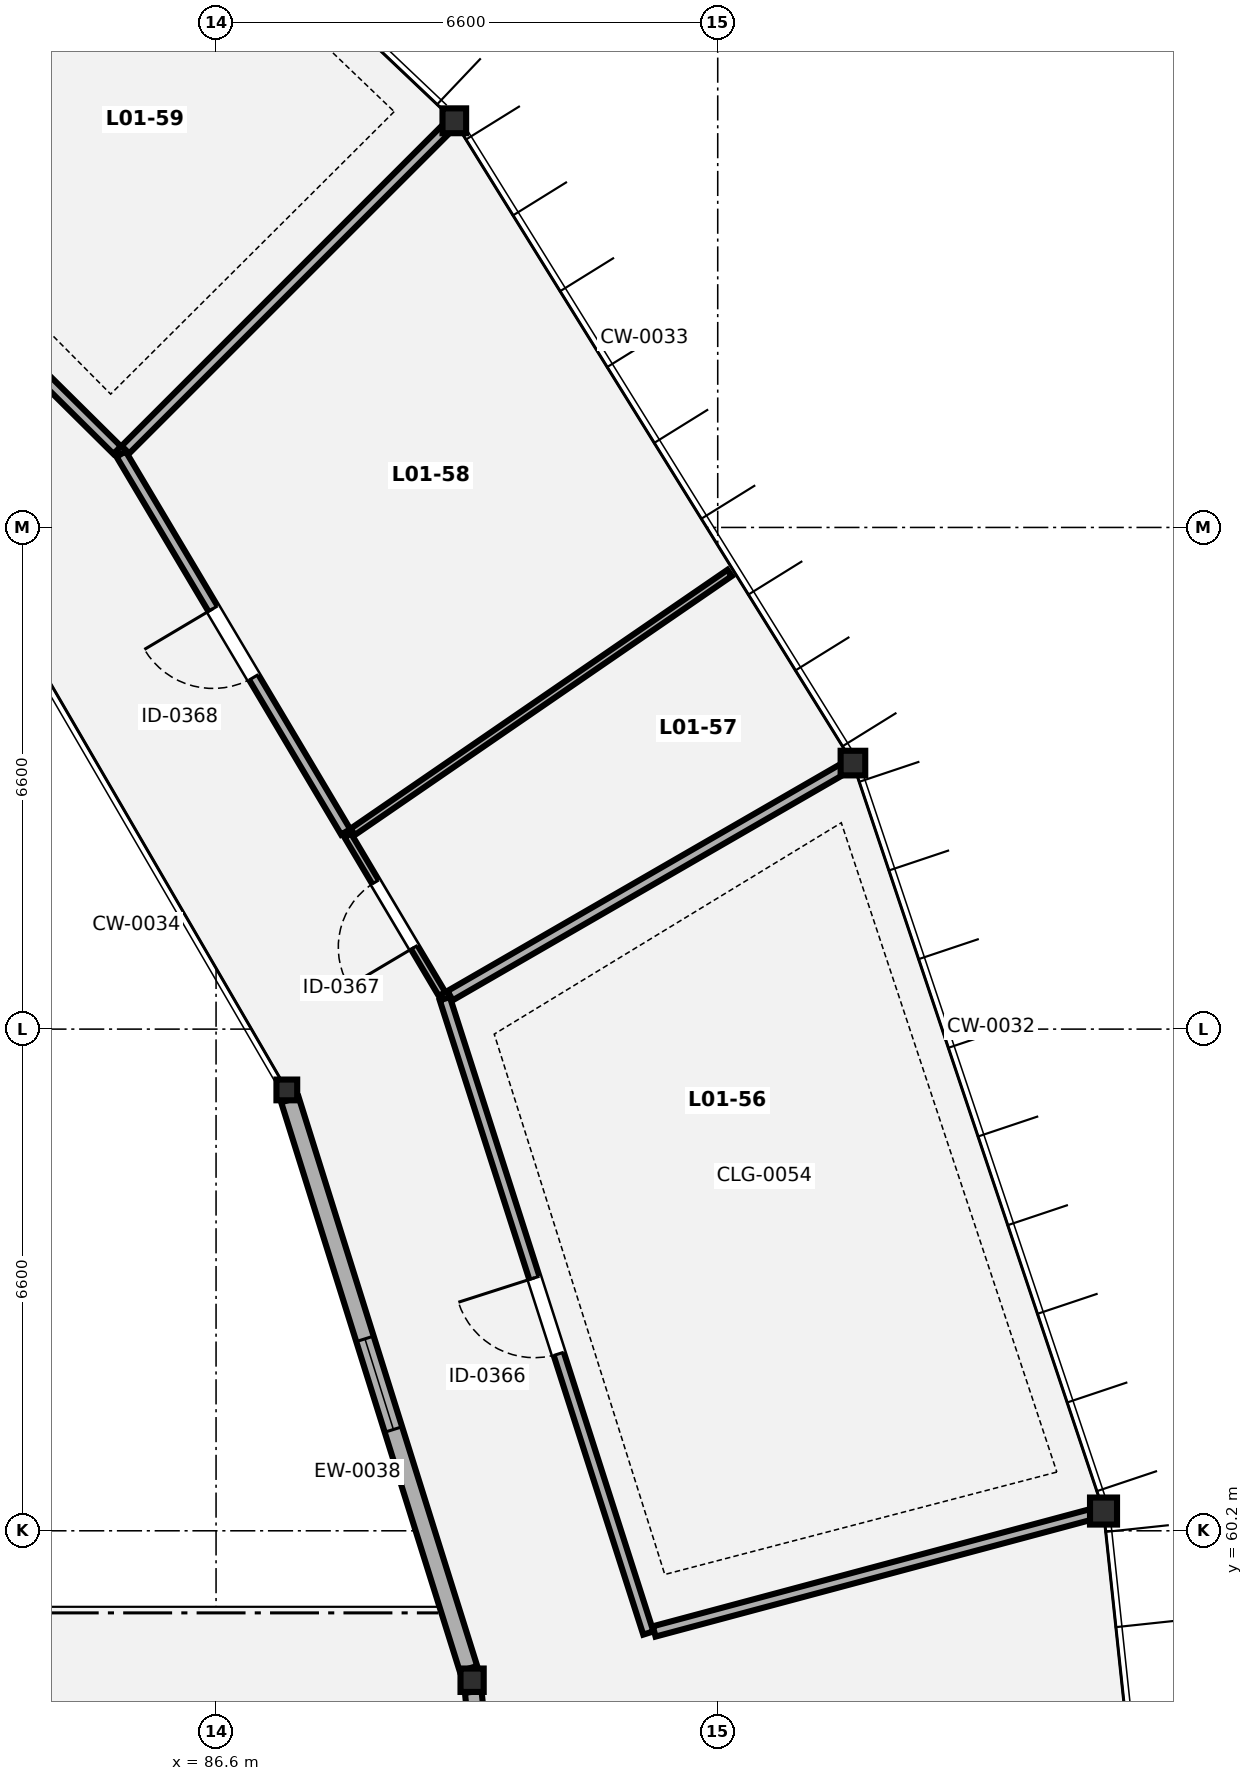
"""IFC4 building model, lengths in metres.
Left out: names, types, materials, properties, quantities, classifications, styles, units other than length and angle.
Written with IfcOpenShell. Run it as: python <this file> out.ifc"""

import sys

from ifc_helpers import new_model, si_unit, direction, frame, frame_2d, origin, origin_2d, place, context, subcontext, project, spatial, rectangle, hollow_circle, i_section, extrude, element, fill, save


model = new_model("IFC4")
c1 = context("Model", 3, precision=1e-05, world=origin(), true_north=direction((0.0, 1.0)))
c2 = subcontext(c1, "Body", "Model", "MODEL_VIEW")
j1 = project(units=[si_unit("LENGTHUNIT", "METRE"), si_unit("PLANEANGLEUNIT", "RADIAN")], contexts=[c1])
p1 = place(None, origin())
s1 = spatial("IfcSite", under=j1, at=p1, CompositionType="ELEMENT")
p2 = place(p1, origin())
s2 = spatial("IfcBuilding", under=s1, at=p2, CompositionType="ELEMENT")
p3 = place(p2, frame((0.0, 0.0, 4.9)))
s3 = spatial("IfcBuildingStorey", under=s2, at=p3, CompositionType="ELEMENT", Elevation=4.9)
p4 = place(p3, frame((98.276, 60.46, 0.0), z_axis=(0.0, 0.0, 1.0), x_axis=(1.0, 0.0, 0.0)))
e1 = element("IfcColumn", 1, at=p4, inside=s3, PredefinedType="COLUMN", context=c2, shape_type="SweptSolid", body=[
    extrude(hollow_circle(Radius=0.178, WallThickness=0.013, at=origin_2d()), origin(), (0.0, 0.0, 1.0), 4.2),
])
p5 = place(p3, frame((89.969, 58.234, 0.0), z_axis=(0.0, 0.0, 1.0), x_axis=(1.0, 0.0, 0.0)))
e2 = element("IfcColumn", 2, at=p5, inside=s3, PredefinedType="COLUMN", context=c2, shape_type="SweptSolid", body=[
    extrude(i_section(OverallWidth=0.305, OverallDepth=0.308, WebThickness=0.01, FlangeThickness=0.015, FilletRadius=0.017, at=origin_2d()), origin(), (0.0, 0.0, 1.0), 4.2),
])
p6 = place(p3, frame((94.979, 70.3, 0.0), z_axis=(0.0, 0.0, 1.0), x_axis=(1.0, 0.0, 0.0)))
e3 = element("IfcColumn", 3, at=p6, inside=s3, PredefinedType="COLUMN", context=c2, shape_type="SweptSolid", body=[
    extrude(hollow_circle(Radius=0.162, WallThickness=0.013, at=origin_2d()), origin(), (0.0, 0.0, 1.0), 4.2),
])
p7 = place(p3, frame((87.531, 66.0, 0.0), z_axis=(0.0, 0.0, 1.0), x_axis=(1.0, 0.0, 0.0)))
e4 = element("IfcColumn", 4, at=p7, inside=s3, PredefinedType="COLUMN", context=c2, shape_type="SweptSolid", body=[
    extrude(hollow_circle(Radius=0.136, WallThickness=0.009, at=origin_2d()), origin(), (0.0, 0.0, 1.0), 4.2),
])
p8 = place(p3, frame((89.735, 78.75, 0.0), z_axis=(0.0, 0.0, 1.0), x_axis=(1.0, 0.0, 0.0)))
e5 = element("IfcColumn", 5, at=p8, inside=s3, PredefinedType="COLUMN", context=c2, shape_type="SweptSolid", body=[
    extrude(i_section(OverallWidth=0.311, OverallDepth=0.327, WebThickness=0.016, FlangeThickness=0.025, FilletRadius=0.017, at=origin_2d()), origin(), (0.0, 0.0, 1.0), 4.2),
])
p9 = place(p3, frame((90.784, 50.055, 0.0), z_axis=(0.0, 0.0, 1.0), x_axis=(-0.099243006395, 0.995063226977, 0.0)))
e6 = element("IfcWall", 6, at=p9, inside=s3, PredefinedType="SOLIDWALL", context=c2, shape_type="SweptSolid", body=[
    extrude(rectangle(XDim=8.066, YDim=0.22, at=frame_2d((4.033, 0.0))), origin(), (0.0, 0.0, 1.0), 3.65),
])
p10 = place(p9, frame((6.506, 0.0, 0.0)))
e7 = element("IfcOpeningElement", 7, at=p10, cuts=e6, PredefinedType="OPENING", context=c2, shape_type="SweptSolid", body=[
    extrude(rectangle(XDim=1.35, YDim=2.15, at=frame_2d((0.675, 1.075))), frame((0.0, 0.12, 0.0), z_axis=(0.0, -1.0, 0.0), x_axis=(1.0, 0.0, 0.0)), (0.0, 0.0, 1.0), 0.24),
])
p11 = place(p3, frame((89.921, 58.386, 0.0), z_axis=(0.0, 0.0, 1.0), x_axis=(-0.299477830639, 0.954103259064, 0.0)))
e8 = element("IfcWall", 8, at=p11, inside=s3, PredefinedType="SOLIDWALL", context=c2, shape_type="SweptSolid", body=[
    extrude(rectangle(XDim=7.846, YDim=0.24, at=frame_2d((3.923, 0.0))), origin(), (0.0, 0.0, 1.0), 3.65),
])
p12 = place(p11, frame((3.298, 0.0, 0.85)))
e9 = element("IfcOpeningElement", 9, at=p12, cuts=e8, PredefinedType="OPENING", context=c2, shape_type="SweptSolid", body=[
    extrude(rectangle(XDim=1.25, YDim=1.4, at=frame_2d((0.625, 0.7))), frame((0.0, 0.13, 0.0), z_axis=(0.0, -1.0, 0.0), x_axis=(1.0, 0.0, 0.0)), (0.0, 0.0, 1.0), 0.26),
])
p13 = place(p3, frame((92.287, 58.855, 0.0), z_axis=(0.0, 0.0, 1.0), x_axis=(-0.30548522006, 0.952196818061, 0.0)))
e10 = element("IfcWall", 10, at=p13, inside=s3, PredefinedType="PARTITIONING", context=c2, shape_type="SweptSolid", body=[
    extrude(rectangle(XDim=8.764, YDim=0.14, at=frame_2d((4.382, 0.0))), origin(), (0.0, 0.0, 1.0), 3.98),
])
p14 = place(p13, frame((3.857, 0.0, 0.0)))
e11 = element("IfcOpeningElement", 11, at=p14, cuts=e10, PredefinedType="OPENING", context=c2, shape_type="SweptSolid", body=[
    extrude(rectangle(XDim=1.05, YDim=2.15, at=frame_2d((0.525, 1.075))), frame((0.0, 0.08, 0.0), z_axis=(0.0, -1.0, 0.0), x_axis=(1.0, 0.0, 0.0)), (0.0, 0.0, 1.0), 0.16),
])
p15 = place(p3, frame((92.364, 58.876, 0.0), z_axis=(0.0, 0.0, 1.0), x_axis=(0.96591927772, 0.258843483457, 0.0)))
e12 = element("IfcWall", 12, at=p15, inside=s3, PredefinedType="PARTITIONING", context=c2, shape_type="SweptSolid", body=[
    extrude(rectangle(XDim=6.06, YDim=0.14, at=frame_2d((3.03, 0.0))), origin(), (0.0, 0.0, 1.0), 3.323),
])
p16 = place(p3, frame((89.679, 67.24, 0.0), z_axis=(0.0, 0.0, 1.0), x_axis=(0.866020543329, 0.500008418462, 0.0)))
e13 = element("IfcWall", 13, at=p16, inside=s3, PredefinedType="PARTITIONING", context=c2, shape_type="SweptSolid", body=[
    extrude(rectangle(XDim=6.06, YDim=0.14, at=frame_2d((3.03, 0.0))), origin(), (0.0, 0.0, 1.0), 3.392),
])
p17 = place(p3, frame((89.573, 67.262, 0.0), z_axis=(0.0, 0.0, 1.0), x_axis=(-0.510928867953, 0.859622994046, 0.0)))
e14 = element("IfcWall", 14, at=p17, inside=s3, PredefinedType="PARTITIONING", context=c2, shape_type="SweptSolid", body=[
    extrude(rectangle(XDim=2.429, YDim=0.1, at=frame_2d((1.214, 0.0))), origin(), (0.0, 0.0, 1.0), 3.98),
])
p18 = place(p17, frame((0.714, 0.0, 0.0)))
e15 = element("IfcOpeningElement", 15, at=p18, cuts=e14, PredefinedType="OPENING", context=c2, shape_type="SweptSolid", body=[
    extrude(rectangle(XDim=1.0, YDim=2.1, at=frame_2d((0.5, 1.05))), frame((0.0, 0.06, 0.0), z_axis=(0.0, -1.0, 0.0), x_axis=(1.0, 0.0, 0.0)), (0.0, 0.0, 1.0), 0.12),
])
p19 = place(p3, frame((88.398, 69.395, 0.0), z_axis=(0.0, 0.0, 1.0), x_axis=(0.824271584206, 0.566194626847, 0.0)))
e16 = element("IfcWall", 16, at=p19, inside=s3, PredefinedType="PARTITIONING", context=c2, shape_type="SweptSolid", body=[
    extrude(rectangle(XDim=6.016, YDim=0.1, at=frame_2d((3.008, 0.0))), origin(), (0.0, 0.0, 1.0), 3.98),
])
p20 = place(p3, frame((88.305, 69.395, 0.0), z_axis=(0.0, 0.0, 1.0), x_axis=(-0.510896676259, 0.859642126811, 0.0)))
e17 = element("IfcWall", 17, at=p20, inside=s3, PredefinedType="PARTITIONING", context=c2, shape_type="SweptSolid", body=[
    extrude(rectangle(XDim=5.783, YDim=0.14, at=frame_2d((2.892, 0.0))), origin(), (0.0, 0.0, 1.0), 3.98),
])
p21 = place(p20, frame((2.366, 0.0, 0.0)))
e18 = element("IfcOpeningElement", 18, at=p21, cuts=e17, PredefinedType="OPENING", context=c2, shape_type="SweptSolid", body=[
    extrude(rectangle(XDim=1.05, YDim=2.15, at=frame_2d((0.525, 1.075))), frame((0.0, 0.08, 0.0), z_axis=(0.0, -1.0, 0.0), x_axis=(1.0, 0.0, 0.0)), (0.0, 0.0, 1.0), 0.16),
])
p22 = place(p3, frame((85.407, 74.423, 0.0), z_axis=(0.0, 0.0, 1.0), x_axis=(0.70712692467, 0.707086637129, 0.0)))
e19 = element("IfcWall", 19, at=p22, inside=s3, PredefinedType="PARTITIONING", context=c2, shape_type="SweptSolid", body=[
    extrude(rectangle(XDim=6.06, YDim=0.14, at=frame_2d((3.03, 0.0))), origin(), (0.0, 0.0, 1.0), 3.392),
])
p23 = place(p3, frame((85.299, 74.417, 0.0), z_axis=(0.0, 0.0, 1.0), x_axis=(-0.710410596589, 0.703787456732, 0.0)))
e20 = element("IfcWall", 20, at=p23, inside=s3, PredefinedType="PARTITIONING", context=c2, shape_type="SweptSolid", body=[
    extrude(rectangle(XDim=7.741, YDim=0.14, at=frame_2d((3.871, 0.0))), origin(), (0.0, 0.0, 1.0), 3.98),
])
p24 = place(p23, frame((3.345, 0.0, 0.0)))
e21 = element("IfcOpeningElement", 21, at=p24, cuts=e20, PredefinedType="OPENING", context=c2, shape_type="SweptSolid", body=[
    extrude(rectangle(XDim=1.05, YDim=2.15, at=frame_2d((0.525, 1.075))), frame((0.0, 0.08, 0.0), z_axis=(0.0, -1.0, 0.0), x_axis=(1.0, 0.0, 0.0)), (0.0, 0.0, 1.0), 0.16),
])
p25 = place(p12, origin())
e22 = element("IfcWindow", 22, at=p25, inside=s3, PartitioningType="SINGLE_PANEL", PredefinedType="WINDOW", context=c2, shape_type="SweptSolid", body=[
    extrude(rectangle(XDim=1.25, YDim=1.4, at=frame_2d((0.625, 0.7))), frame((0.0, 0.03, 0.0), z_axis=(0.0, -1.0, 0.0), x_axis=(1.0, 0.0, 0.0)), (0.0, 0.0, 1.0), 0.06),
])
fill(e9, e22)
p26 = place(p14, origin())
e23 = element("IfcDoor", 23, at=p26, inside=s3, OperationType="SINGLE_SWING_RIGHT", PredefinedType="DOOR", context=c2, shape_type="SweptSolid", body=[
    extrude(rectangle(XDim=1.05, YDim=2.15, at=frame_2d((0.525, 1.075))), frame((0.0, 0.025, 0.0), z_axis=(0.0, -1.0, 0.0), x_axis=(1.0, 0.0, 0.0)), (0.0, 0.0, 1.0), 0.05),
])
fill(e11, e23)
p27 = place(p18, origin())
e24 = element("IfcDoor", 24, at=p27, inside=s3, OperationType="SINGLE_SWING_LEFT", PredefinedType="DOOR", context=c2, shape_type="SweptSolid", body=[
    extrude(rectangle(XDim=1.0, YDim=2.1, at=frame_2d((0.5, 1.05))), frame((0.0, 0.025, 0.0), z_axis=(0.0, -1.0, 0.0), x_axis=(1.0, 0.0, 0.0)), (0.0, 0.0, 1.0), 0.05),
])
fill(e15, e24)
p28 = place(p21, origin())
e25 = element("IfcDoor", 25, at=p28, inside=s3, OperationType="SINGLE_SWING_RIGHT", PredefinedType="DOOR", context=c2, shape_type="SweptSolid", body=[
    extrude(rectangle(XDim=1.05, YDim=2.15, at=frame_2d((0.525, 1.075))), frame((0.0, 0.025, 0.0), z_axis=(0.0, -1.0, 0.0), x_axis=(1.0, 0.0, 0.0)), (0.0, 0.0, 1.0), 0.05),
])
fill(e18, e25)
save(model, sys.argv[1])
